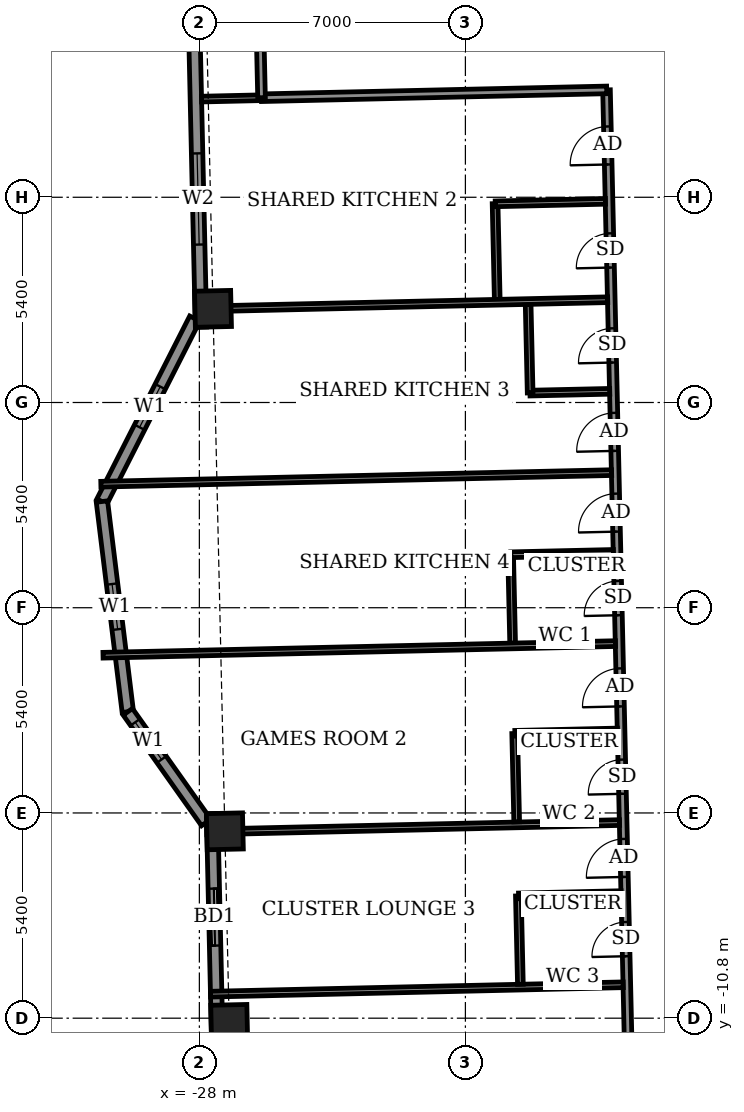
"""IFC4 building model, lengths in metres.
Left out: names, types, materials, properties, quantities, classifications, styles, units other than length and angle.
Written with IfcOpenShell. Run it as: python <this file> out.ifc"""

import sys

from ifc_helpers import new_model, si_unit, direction, frame, frame_2d, origin, origin_2d, place, context, subcontext, project, spatial, rectangle, extrude, element, fill, save


model = new_model("IFC4")
c1 = context("Model", 3, precision=1e-05, world=origin(), true_north=direction((0.0, 1.0)))
c2 = subcontext(c1, "Body", "Model", "MODEL_VIEW")
j1 = project(units=[si_unit("LENGTHUNIT", "METRE"), si_unit("PLANEANGLEUNIT", "RADIAN")], contexts=[c1])
p1 = place(None, origin())
s1 = spatial("IfcSite", under=j1, at=p1, CompositionType="ELEMENT")
p2 = place(p1, origin())
s2 = spatial("IfcBuilding", under=s1, at=p2, CompositionType="ELEMENT")
p3 = place(p2, frame((0.0, 0.0, 290.7)))
s3 = spatial("IfcBuildingStorey", under=s2, at=p3, CompositionType="ELEMENT", Elevation=290.7)
for number, where, z_axis, x_axis in (
    (1, (-27.329, -5.883, -0.55), (0.0, 0.0, 1.0), (0.023, -1.0, 0.0)),
    (2, (-27.215, -10.924, -0.55), (0.0, 0.0, 1.0), (0.023, -1.0, 0.0)),
    (3, (-27.641, 7.864, -0.55), (0.0, 0.0, 1.0), (0.023, -1.0, 0.0)),
):
    element("IfcColumn", number, at=place(p3, frame(where, z_axis=z_axis, x_axis=x_axis)), inside=s3, PredefinedType="COLUMN", context=c2, shape_type="SweptSolid", body=[
        extrude(rectangle(XDim=0.95, YDim=0.95, at=origin_2d()), origin(), (0.0, 0.0, 1.0), 3.6),
    ])
p4 = place(p3, frame((-28.297, 22.427, 0.0), z_axis=(0.0, 0.0, 1.0), x_axis=(0.022663916124, -0.999743140465, 0.0)))
e4 = element("IfcWall", 4, at=p4, inside=s3, PredefinedType="SOLIDWALL", context=c2, shape_type="SweptSolid", body=[
    extrude(rectangle(XDim=15.049, YDim=0.3, at=frame_2d((7.524, 0.0))), origin(), (0.0, 0.0, 1.0), 2.5),
])
p5 = place(p4, frame((3.002, 0.0, 0.0)))
e5 = element("IfcOpeningElement", 5, at=p5, cuts=e4, PredefinedType="OPENING", context=c2, shape_type="SweptSolid", body=[
    extrude(rectangle(XDim=1.5, YDim=2.4, at=frame_2d((0.75, 1.2))), frame((0.0, 0.16, 0.0), z_axis=(0.0, -1.0, 0.0), x_axis=(1.0, 0.0, 0.0)), (0.0, 0.0, 1.0), 0.32),
])
p6 = place(p4, frame((10.475, 0.0, 0.9)))
e6 = element("IfcOpeningElement", 6, at=p6, cuts=e4, PredefinedType="OPENING", context=c2, shape_type="SweptSolid", body=[
    extrude(rectangle(XDim=2.4, YDim=1.5, at=frame_2d((1.2, 0.75))), frame((0.0, 0.16, 0.0), z_axis=(0.0, -1.0, 0.0), x_axis=(1.0, 0.0, 0.0)), (0.0, 0.0, 1.0), 0.32),
])
p7 = place(p3, frame((-28.12, 7.608, 0.0), z_axis=(0.0, 0.0, 1.0), x_axis=(-0.45266802131, -0.891679125293, 0.0)))
e7 = element("IfcWall", 7, at=p7, inside=s3, PredefinedType="SOLIDWALL", context=c2, shape_type="SweptSolid", body=[
    extrude(rectangle(XDim=5.399, YDim=0.3, at=frame_2d((2.699, 0.0))), origin(), (0.0, 0.0, 1.0), 3.05),
])
p8 = place(p7, frame((2.008, 0.0, 0.9)))
e8 = element("IfcOpeningElement", 8, at=p8, cuts=e7, PredefinedType="OPENING", context=c2, shape_type="SweptSolid", body=[
    extrude(rectangle(XDim=1.2, YDim=1.5, at=frame_2d((0.6, 0.75))), frame((0.0, 0.16, 0.0), z_axis=(0.0, -1.0, 0.0), x_axis=(1.0, 0.0, 0.0)), (0.0, 0.0, 1.0), 0.32),
])
p9 = place(p3, frame((-30.564, 2.794, 0.0), z_axis=(0.0, 0.0, 1.0), x_axis=(0.122163831021, -0.992509948761, 0.0)))
e9 = element("IfcWall", 9, at=p9, inside=s3, PredefinedType="SOLIDWALL", context=c2, shape_type="SweptSolid", body=[
    extrude(rectangle(XDim=5.574, YDim=0.3, at=frame_2d((2.787, 0.0))), origin(), (0.0, 0.0, 1.0), 3.05),
])
p10 = place(p9, frame((2.187, 0.0, 0.9)))
e10 = element("IfcOpeningElement", 10, at=p10, cuts=e9, PredefinedType="OPENING", context=c2, shape_type="SweptSolid", body=[
    extrude(rectangle(XDim=1.2, YDim=1.5, at=frame_2d((0.6, 0.75))), frame((0.0, 0.16, 0.0), z_axis=(0.0, -1.0, 0.0), x_axis=(1.0, 0.0, 0.0)), (0.0, 0.0, 1.0), 0.32),
])
p11 = place(p3, frame((-29.883, -2.738, 0.0), z_axis=(0.0, 0.0, 1.0), x_axis=(0.578095163598, -0.815969351033, 0.0)))
e11 = element("IfcWall", 11, at=p11, inside=s3, PredefinedType="SOLIDWALL", context=c2, shape_type="SweptSolid", body=[
    extrude(rectangle(XDim=3.569, YDim=0.3, at=frame_2d((1.784, 0.0))), origin(), (0.0, 0.0, 1.0), 3.05),
])
p12 = place(p11, frame((0.338, 0.0, 0.9)))
e12 = element("IfcOpeningElement", 12, at=p12, cuts=e11, PredefinedType="OPENING", context=c2, shape_type="SweptSolid", body=[
    extrude(rectangle(XDim=1.2, YDim=1.5, at=frame_2d((0.6, 0.75))), frame((0.0, 0.16, 0.0), z_axis=(0.0, -1.0, 0.0), x_axis=(1.0, 0.0, 0.0)), (0.0, 0.0, 1.0), 0.32),
])
p13 = place(p3, frame((-27.665, -5.416, 0.0), z_axis=(0.0, 0.0, 1.0), x_axis=(0.022660024814, -0.999743228672, 0.0)))
e13 = element("IfcWall", 13, at=p13, inside=s3, PredefinedType="SOLIDWALL", context=c2, shape_type="SweptSolid", body=[
    extrude(rectangle(XDim=15.45, YDim=0.3, at=frame_2d((7.725, 0.0))), origin(), (0.0, 0.0, 1.0), 2.55),
])
p14 = place(p13, frame((1.975, 0.0, 0.0)))
e14 = element("IfcOpeningElement", 14, at=p14, cuts=e13, PredefinedType="OPENING", context=c2, shape_type="SweptSolid", body=[
    extrude(rectangle(XDim=1.5, YDim=2.4, at=frame_2d((0.75, 1.2))), frame((0.0, 0.16, 0.0), z_axis=(0.0, -1.0, 0.0), x_axis=(1.0, 0.0, 0.0)), (0.0, 0.0, 1.0), 0.32),
])
p15 = place(p13, frame((6.171, 0.0, 0.9)))
e15 = element("IfcOpeningElement", 15, at=p15, cuts=e13, PredefinedType="OPENING", context=c2, shape_type="SweptSolid", body=[
    extrude(rectangle(XDim=1.2, YDim=1.5, at=frame_2d((0.6, 0.75))), frame((0.0, 0.16, 0.0), z_axis=(0.0, -1.0, 0.0), x_axis=(1.0, 0.0, 0.0)), (0.0, 0.0, 1.0), 0.32),
])
p16 = place(p13, frame((8.05, 0.0, 0.9)))
e16 = element("IfcOpeningElement", 16, at=p16, cuts=e13, PredefinedType="OPENING", context=c2, shape_type="SweptSolid", body=[
    extrude(rectangle(XDim=0.9, YDim=1.5, at=frame_2d((0.45, 0.75))), frame((0.0, 0.16, 0.0), z_axis=(0.0, -1.0, 0.0), x_axis=(1.0, 0.0, 0.0)), (0.0, 0.0, 1.0), 0.32),
])
p17 = place(p13, frame((11.625, 0.0, 0.9)))
e17 = element("IfcOpeningElement", 17, at=p17, cuts=e13, PredefinedType="OPENING", context=c2, shape_type="SweptSolid", body=[
    extrude(rectangle(XDim=2.4, YDim=1.5, at=frame_2d((1.2, 0.75))), frame((0.0, 0.16, 0.0), z_axis=(0.0, -1.0, 0.0), x_axis=(1.0, 0.0, 0.0)), (0.0, 0.0, 1.0), 0.32),
])
p18 = place(p3, frame((-16.684, -12.919, 0.0), z_axis=(0.0, 0.0, 1.0), x_axis=(-0.022712214871, 0.999742044377, 0.0)))
e18 = element("IfcWall", 18, at=p18, inside=s3, PredefinedType="PARTITIONING", context=c2, shape_type="SweptSolid", body=[
    extrude(rectangle(XDim=26.551, YDim=0.2, at=frame_2d((13.275, 0.0))), origin(), (0.0, 0.0, 1.0), 3.05),
])
p19 = place(p18, frame((24.588, 0.0, 0.0)))
e19 = element("IfcOpeningElement", 19, at=p19, cuts=e18, PredefinedType="OPENING", context=c2, shape_type="SweptSolid", body=[
    extrude(rectangle(XDim=1.0, YDim=2.1, at=frame_2d((0.5, 1.05))), frame((0.0, 0.11, 0.0), z_axis=(0.0, -1.0, 0.0), x_axis=(1.0, 0.0, 0.0)), (0.0, 0.0, 1.0), 0.22),
])
p20 = place(p18, frame((21.875, 0.0, 0.0)))
e20 = element("IfcOpeningElement", 20, at=p20, cuts=e18, PredefinedType="OPENING", context=c2, shape_type="SweptSolid", body=[
    extrude(rectangle(XDim=0.9, YDim=2.1, at=frame_2d((0.45, 1.05))), frame((0.0, 0.11, 0.0), z_axis=(0.0, -1.0, 0.0), x_axis=(1.0, 0.0, 0.0)), (0.0, 0.0, 1.0), 0.22),
])
p21 = place(p18, frame((17.05, 0.0, 0.0)))
e21 = element("IfcOpeningElement", 21, at=p21, cuts=e18, PredefinedType="OPENING", context=c2, shape_type="SweptSolid", body=[
    extrude(rectangle(XDim=1.0, YDim=2.1, at=frame_2d((0.5, 1.05))), frame((0.0, 0.11, 0.0), z_axis=(0.0, -1.0, 0.0), x_axis=(1.0, 0.0, 0.0)), (0.0, 0.0, 1.0), 0.22),
])
p22 = place(p18, frame((19.375, 0.0, 0.0)))
e22 = element("IfcOpeningElement", 22, at=p22, cuts=e18, PredefinedType="OPENING", context=c2, shape_type="SweptSolid", body=[
    extrude(rectangle(XDim=0.9, YDim=2.1, at=frame_2d((0.45, 1.05))), frame((0.0, 0.11, 0.0), z_axis=(0.0, -1.0, 0.0), x_axis=(1.0, 0.0, 0.0)), (0.0, 0.0, 1.0), 0.22),
])
p23 = place(p18, frame((14.925, 0.0, 0.0)))
e23 = element("IfcOpeningElement", 23, at=p23, cuts=e18, PredefinedType="OPENING", context=c2, shape_type="SweptSolid", body=[
    extrude(rectangle(XDim=1.0, YDim=2.1, at=frame_2d((0.5, 1.05))), frame((0.0, 0.11, 0.0), z_axis=(0.0, -1.0, 0.0), x_axis=(1.0, 0.0, 0.0)), (0.0, 0.0, 1.0), 0.22),
])
p24 = place(p18, frame((12.725, 0.0, 0.0)))
e24 = element("IfcOpeningElement", 24, at=p24, cuts=e18, PredefinedType="OPENING", context=c2, shape_type="SweptSolid", body=[
    extrude(rectangle(XDim=0.9, YDim=2.1, at=frame_2d((0.45, 1.05))), frame((0.0, 0.11, 0.0), z_axis=(0.0, -1.0, 0.0), x_axis=(1.0, 0.0, 0.0)), (0.0, 0.0, 1.0), 0.22),
])
p25 = place(p18, frame((10.325, 0.0, 0.0)))
e25 = element("IfcOpeningElement", 25, at=p25, cuts=e18, PredefinedType="OPENING", context=c2, shape_type="SweptSolid", body=[
    extrude(rectangle(XDim=1.0, YDim=2.1, at=frame_2d((0.5, 1.05))), frame((0.0, 0.11, 0.0), z_axis=(0.0, -1.0, 0.0), x_axis=(1.0, 0.0, 0.0)), (0.0, 0.0, 1.0), 0.22),
])
p26 = place(p18, frame((8.025, 0.0, 0.0)))
e26 = element("IfcOpeningElement", 26, at=p26, cuts=e18, PredefinedType="OPENING", context=c2, shape_type="SweptSolid", body=[
    extrude(rectangle(XDim=0.9, YDim=2.1, at=frame_2d((0.45, 1.05))), frame((0.0, 0.11, 0.0), z_axis=(0.0, -1.0, 0.0), x_axis=(1.0, 0.0, 0.0)), (0.0, 0.0, 1.0), 0.22),
])
p27 = place(p18, frame((5.837, 0.0, 0.0)))
e27 = element("IfcOpeningElement", 27, at=p27, cuts=e18, PredefinedType="OPENING", context=c2, shape_type="SweptSolid", body=[
    extrude(rectangle(XDim=1.0, YDim=2.1, at=frame_2d((0.5, 1.05))), frame((0.0, 0.11, 0.0), z_axis=(0.0, -1.0, 0.0), x_axis=(1.0, 0.0, 0.0)), (0.0, 0.0, 1.0), 0.22),
])
p28 = place(p18, frame((3.75, 0.0, 0.0)))
e28 = element("IfcOpeningElement", 28, at=p28, cuts=e18, PredefinedType="OPENING", context=c2, shape_type="SweptSolid", body=[
    extrude(rectangle(XDim=0.9, YDim=2.1, at=frame_2d((0.45, 1.05))), frame((0.0, 0.11, 0.0), z_axis=(0.0, -1.0, 0.0), x_axis=(1.0, 0.0, 0.0)), (0.0, 0.0, 1.0), 0.22),
])
p29 = place(p3, frame((-27.707, -10.168, 0.0), z_axis=(0.0, 0.0, 1.0), x_axis=(0.999741313154, 0.022744378952, 0.0)))
e29 = element("IfcWall", 29, at=p29, inside=s3, PredefinedType="PARTITIONING", context=c2, shape_type="SweptSolid", body=[
    extrude(rectangle(XDim=10.863, YDim=0.15, at=frame_2d((5.432, 0.0))), origin(), (0.0, 0.0, 1.0), 2.55),
])
p30 = place(p3, frame((-19.553, -9.908, 0.0), z_axis=(0.0, 0.0, 1.0), x_axis=(-0.022781023197, 0.999740478815, 0.0)))
e30 = element("IfcWall", 30, at=p30, inside=s3, PredefinedType="PARTITIONING", context=c2, shape_type="SweptSolid", body=[
    extrude(rectangle(XDim=2.325, YDim=0.15, at=frame_2d((1.163, 0.0))), origin(), (0.0, 0.0, 1.0), 3.05),
])
p31 = place(p3, frame((-19.601, -7.583, 0.0), z_axis=(0.0, 0.0, 1.0), x_axis=(0.999744396973, 0.02260842146, 0.0)))
e31 = element("IfcWall", 31, at=p31, inside=s3, PredefinedType="PARTITIONING", context=c2, shape_type="SweptSolid", body=[
    extrude(rectangle(XDim=2.7, YDim=0.15, at=frame_2d((1.35, 0.0))), origin(), (0.0, 0.0, 1.0), 3.05),
])
p32 = place(p3, frame((-27.804, -5.899, 0.0), z_axis=(0.0, 0.0, 1.0), x_axis=(0.999743850541, 0.02263257177, 0.0)))
e32 = element("IfcWall", 32, at=p32, inside=s3, PredefinedType="PARTITIONING", context=c2, shape_type="SweptSolid", body=[
    extrude(rectangle(XDim=10.863, YDim=0.15, at=frame_2d((5.431, 0.0))), origin(), (0.0, 0.0, 1.0), 3.05),
])
p33 = place(p3, frame((-19.65, -5.634, 0.0), z_axis=(0.0, 0.0, 1.0), x_axis=(-0.02279059109, 0.999740260747, 0.0)))
e33 = element("IfcWall", 33, at=p33, inside=s3, PredefinedType="PARTITIONING", context=c2, shape_type="SweptSolid", body=[
    extrude(rectangle(XDim=2.324, YDim=0.15, at=frame_2d((1.162, 0.0))), origin(), (0.0, 0.0, 1.0), 3.05),
])
p34 = place(p3, frame((-19.698, -3.304, 0.0), z_axis=(0.0, 0.0, 1.0), x_axis=(0.999744396973, 0.02260842146, 0.0)))
e34 = element("IfcWall", 34, at=p34, inside=s3, PredefinedType="PARTITIONING", context=c2, shape_type="SweptSolid", body=[
    extrude(rectangle(XDim=2.7, YDim=0.15, at=frame_2d((1.35, 0.0))), origin(), (0.0, 0.0, 1.0), 3.05),
])
p35 = place(p3, frame((-19.757, -0.935, 0.0), z_axis=(0.0, 0.0, 1.0), x_axis=(-0.02279059109, 0.999740260747, 0.0)))
e35 = element("IfcWall", 35, at=p35, inside=s3, PredefinedType="PARTITIONING", context=c2, shape_type="SweptSolid", body=[
    extrude(rectangle(XDim=2.324, YDim=0.15, at=frame_2d((1.162, 0.0))), origin(), (0.0, 0.0, 1.0), 3.05),
])
p36 = place(p3, frame((-30.535, -1.25, 0.0), z_axis=(0.0, 0.0, 1.0), x_axis=(0.999742750552, 0.022681109296, 0.0)))
e36 = element("IfcWall", 36, at=p36, inside=s3, PredefinedType="PARTITIONING", context=c2, shape_type="SweptSolid", body=[
    extrude(rectangle(XDim=13.487, YDim=0.15, at=frame_2d((6.744, 0.0))), origin(), (0.0, 0.0, 1.0), 2.05),
])
p37 = place(p3, frame((-19.805, 1.394, 0.0), z_axis=(0.0, 0.0, 1.0), x_axis=(0.999736346258, 0.022961663075, 0.0)))
e37 = element("IfcWall", 37, at=p37, inside=s3, PredefinedType="PARTITIONING", context=c2, shape_type="SweptSolid", body=[
    extrude(rectangle(XDim=2.701, YDim=0.15, at=frame_2d((1.35, 0.0))), origin(), (0.0, 0.0, 1.0), 3.05),
])
p38 = place(p3, frame((-30.592, 3.25, 0.0), z_axis=(0.0, 0.0, 1.0), x_axis=(0.999742678725, 0.022684275074, 0.0)))
e38 = element("IfcWall", 38, at=p38, inside=s3, PredefinedType="PARTITIONING", context=c2, shape_type="SweptSolid", body=[
    extrude(rectangle(XDim=13.442, YDim=0.15, at=frame_2d((6.721, 0.0))), origin(), (0.0, 0.0, 1.0), 2.05),
])
p39 = place(p3, frame((-19.301, 5.647, 0.0), z_axis=(0.0, 0.0, 1.0), x_axis=(0.999748159451, 0.022441427631, 0.0)))
e39 = element("IfcWall", 39, at=p39, inside=s3, PredefinedType="PARTITIONING", context=c2, shape_type="SweptSolid", body=[
    extrude(rectangle(XDim=2.1, YDim=0.15, at=frame_2d((1.05, 0.0))), origin(), (0.0, 0.0, 1.0), 3.05),
])
p40 = place(p3, frame((-19.296, 5.652, 0.0), z_axis=(0.0, 0.0, 1.0), x_axis=(-0.022895561926, 0.999737862264, 0.0)))
e40 = element("IfcWall", 40, at=p40, inside=s3, PredefinedType="PARTITIONING", context=c2, shape_type="SweptSolid", body=[
    extrude(rectangle(XDim=2.324, YDim=0.15, at=frame_2d((1.162, 0.0))), origin(), (0.0, 0.0, 1.0), 3.05),
])
p41 = place(p3, frame((-20.162, 8.108, 0.0), z_axis=(0.0, 0.0, 1.0), x_axis=(-0.022530308093, 0.999746160391, 0.0)))
e41 = element("IfcWall", 41, at=p41, inside=s3, PredefinedType="PARTITIONING", context=c2, shape_type="SweptSolid", body=[
    extrude(rectangle(XDim=2.525, YDim=0.15, at=frame_2d((1.262, 0.0))), origin(), (0.0, 0.0, 1.0), 3.05),
])
p42 = place(p3, frame((-27.817, 7.864, 0.0), z_axis=(0.0, 0.0, 1.0), x_axis=(0.9997418952, 0.022718780382, 0.0)))
e42 = element("IfcWall", 42, at=p42, inside=s3, PredefinedType="PARTITIONING", context=c2, shape_type="SweptSolid", body=[
    extrude(rectangle(XDim=10.563, YDim=0.15, at=frame_2d((5.282, 0.0))), origin(), (0.0, 0.0, 1.0), 3.05),
])
p43 = place(p3, frame((-20.214, 10.627, 0.0), z_axis=(0.0, 0.0, 1.0), x_axis=(0.999739701447, 0.022815112345, 0.0)))
e43 = element("IfcWall", 43, at=p43, inside=s3, PredefinedType="PARTITIONING", context=c2, shape_type="SweptSolid", body=[
    extrude(rectangle(XDim=2.9, YDim=0.15, at=frame_2d((1.45, 0.0))), origin(), (0.0, 0.0, 1.0), 3.05),
])
p44 = place(p3, frame((-27.942, 13.383, 0.0), z_axis=(0.0, 0.0, 1.0), x_axis=(0.999741755729, 0.022724916977, 0.0)))
e44 = element("IfcWall", 44, at=p44, inside=s3, PredefinedType="PARTITIONING", context=c2, shape_type="SweptSolid", body=[
    extrude(rectangle(XDim=1.579, YDim=0.15, at=frame_2d((0.79, 0.0))), origin(), (0.0, 0.0, 1.0), 2.5),
])
p45 = place(p3, frame((-26.367, 13.419, 0.0), z_axis=(0.0, 0.0, 1.0), x_axis=(0.999742888587, 0.022675024131, 0.0)))
e45 = element("IfcWall", 45, at=p45, inside=s3, PredefinedType="PARTITIONING", context=c2, shape_type="SweptSolid", body=[
    extrude(rectangle(XDim=9.087, YDim=0.2, at=frame_2d((4.544, 0.0))), origin(), (0.0, 0.0, 1.0), 3.05),
])
p46 = place(p3, frame((-26.364, 13.419, 0.0), z_axis=(0.0, 0.0, 1.0), x_axis=(-0.022632637625, 0.99974384905, 0.0)))
e46 = element("IfcWall", 46, at=p46, inside=s3, PredefinedType="PARTITIONING", context=c2, shape_type="SweptSolid", body=[
    extrude(rectangle(XDim=1.5, YDim=0.2, at=frame_2d((0.75, 0.0))), origin(), (0.0, 0.0, 1.0), 3.05),
])
p47 = place(p6, origin())
e47 = element("IfcWindow", 47, at=p47, inside=s3, PartitioningType="DOUBLE_PANEL_VERTICAL", PredefinedType="WINDOW", context=c2, shape_type="SweptSolid", body=[
    extrude(rectangle(XDim=2.4, YDim=1.5, at=frame_2d((1.2, 0.75))), frame((0.0, 0.03, 0.0), z_axis=(0.0, -1.0, 0.0), x_axis=(1.0, 0.0, 0.0)), (0.0, 0.0, 1.0), 0.06),
])
fill(e6, e47)
p48 = place(p8, origin())
e48 = element("IfcWindow", 48, at=p48, inside=s3, PartitioningType="SINGLE_PANEL", PredefinedType="WINDOW", context=c2, shape_type="SweptSolid", body=[
    extrude(rectangle(XDim=1.2, YDim=1.5, at=frame_2d((0.6, 0.75))), frame((0.0, 0.03, 0.0), z_axis=(0.0, -1.0, 0.0), x_axis=(1.0, 0.0, 0.0)), (0.0, 0.0, 1.0), 0.06),
])
fill(e8, e48)
p49 = place(p10, origin())
e49 = element("IfcWindow", 49, at=p49, inside=s3, PartitioningType="SINGLE_PANEL", PredefinedType="WINDOW", context=c2, shape_type="SweptSolid", body=[
    extrude(rectangle(XDim=1.2, YDim=1.5, at=frame_2d((0.6, 0.75))), frame((0.0, 0.03, 0.0), z_axis=(0.0, -1.0, 0.0), x_axis=(1.0, 0.0, 0.0)), (0.0, 0.0, 1.0), 0.06),
])
fill(e10, e49)
p50 = place(p12, origin())
e50 = element("IfcWindow", 50, at=p50, inside=s3, PartitioningType="SINGLE_PANEL", PredefinedType="WINDOW", context=c2, shape_type="SweptSolid", body=[
    extrude(rectangle(XDim=1.2, YDim=1.5, at=frame_2d((0.6, 0.75))), frame((0.0, 0.03, 0.0), z_axis=(0.0, -1.0, 0.0), x_axis=(1.0, 0.0, 0.0)), (0.0, 0.0, 1.0), 0.06),
])
fill(e12, e50)
p51 = place(p14, origin())
e51 = element("IfcDoor", 51, at=p51, inside=s3, OperationType="SLIDING_TO_LEFT", PredefinedType="DOOR", context=c2, shape_type="SweptSolid", body=[
    extrude(rectangle(XDim=1.5, YDim=2.4, at=frame_2d((0.75, 1.2))), frame((0.0, 0.025, 0.0), z_axis=(0.0, -1.0, 0.0), x_axis=(1.0, 0.0, 0.0)), (0.0, 0.0, 1.0), 0.05),
])
fill(e14, e51)
p52 = place(p19, origin())
e52 = element("IfcDoor", 52, at=p52, inside=s3, OperationType="SINGLE_SWING_LEFT", PredefinedType="DOOR", context=c2, shape_type="SweptSolid", body=[
    extrude(rectangle(XDim=1.0, YDim=2.1, at=frame_2d((0.5, 1.05))), frame((0.0, 0.025, 0.0), z_axis=(0.0, -1.0, 0.0), x_axis=(1.0, 0.0, 0.0)), (0.0, 0.0, 1.0), 0.05),
])
fill(e19, e52)
p53 = place(p20, origin())
e53 = element("IfcDoor", 53, at=p53, inside=s3, OperationType="SINGLE_SWING_LEFT", PredefinedType="DOOR", context=c2, shape_type="SweptSolid", body=[
    extrude(rectangle(XDim=0.9, YDim=2.1, at=frame_2d((0.45, 1.05))), frame((0.0, 0.025, 0.0), z_axis=(0.0, -1.0, 0.0), x_axis=(1.0, 0.0, 0.0)), (0.0, 0.0, 1.0), 0.05),
])
fill(e20, e53)
p54 = place(p21, origin())
e54 = element("IfcDoor", 54, at=p54, inside=s3, OperationType="SINGLE_SWING_RIGHT", PredefinedType="DOOR", context=c2, shape_type="SweptSolid", body=[
    extrude(rectangle(XDim=1.0, YDim=2.1, at=frame_2d((0.5, 1.05))), frame((0.0, 0.025, 0.0), z_axis=(0.0, -1.0, 0.0), x_axis=(1.0, 0.0, 0.0)), (0.0, 0.0, 1.0), 0.05),
])
fill(e21, e54)
p55 = place(p22, origin())
e55 = element("IfcDoor", 55, at=p55, inside=s3, OperationType="SINGLE_SWING_RIGHT", PredefinedType="DOOR", context=c2, shape_type="SweptSolid", body=[
    extrude(rectangle(XDim=0.9, YDim=2.1, at=frame_2d((0.45, 1.05))), frame((0.0, 0.025, 0.0), z_axis=(0.0, -1.0, 0.0), x_axis=(1.0, 0.0, 0.0)), (0.0, 0.0, 1.0), 0.05),
])
fill(e22, e55)
p56 = place(p23, origin())
e56 = element("IfcDoor", 56, at=p56, inside=s3, OperationType="SINGLE_SWING_LEFT", PredefinedType="DOOR", context=c2, shape_type="SweptSolid", body=[
    extrude(rectangle(XDim=1.0, YDim=2.1, at=frame_2d((0.5, 1.05))), frame((0.0, 0.025, 0.0), z_axis=(0.0, -1.0, 0.0), x_axis=(1.0, 0.0, 0.0)), (0.0, 0.0, 1.0), 0.05),
])
fill(e23, e56)
p57 = place(p24, origin())
e57 = element("IfcDoor", 57, at=p57, inside=s3, OperationType="SINGLE_SWING_LEFT", PredefinedType="DOOR", context=c2, shape_type="SweptSolid", body=[
    extrude(rectangle(XDim=0.9, YDim=2.1, at=frame_2d((0.45, 1.05))), frame((0.0, 0.025, 0.0), z_axis=(0.0, -1.0, 0.0), x_axis=(1.0, 0.0, 0.0)), (0.0, 0.0, 1.0), 0.05),
])
fill(e24, e57)
p58 = place(p25, origin())
e58 = element("IfcDoor", 58, at=p58, inside=s3, OperationType="SINGLE_SWING_RIGHT", PredefinedType="DOOR", context=c2, shape_type="SweptSolid", body=[
    extrude(rectangle(XDim=1.0, YDim=2.1, at=frame_2d((0.5, 1.05))), frame((0.0, 0.025, 0.0), z_axis=(0.0, -1.0, 0.0), x_axis=(1.0, 0.0, 0.0)), (0.0, 0.0, 1.0), 0.05),
])
fill(e25, e58)
p59 = place(p26, origin())
e59 = element("IfcDoor", 59, at=p59, inside=s3, OperationType="SINGLE_SWING_RIGHT", PredefinedType="DOOR", context=c2, shape_type="SweptSolid", body=[
    extrude(rectangle(XDim=0.9, YDim=2.1, at=frame_2d((0.45, 1.05))), frame((0.0, 0.025, 0.0), z_axis=(0.0, -1.0, 0.0), x_axis=(1.0, 0.0, 0.0)), (0.0, 0.0, 1.0), 0.05),
])
fill(e26, e59)
p60 = place(p27, origin())
e60 = element("IfcDoor", 60, at=p60, inside=s3, OperationType="SINGLE_SWING_LEFT", PredefinedType="DOOR", context=c2, shape_type="SweptSolid", body=[
    extrude(rectangle(XDim=1.0, YDim=2.1, at=frame_2d((0.5, 1.05))), frame((0.0, 0.025, 0.0), z_axis=(0.0, -1.0, 0.0), x_axis=(1.0, 0.0, 0.0)), (0.0, 0.0, 1.0), 0.05),
])
fill(e27, e60)
p61 = place(p28, origin())
e61 = element("IfcDoor", 61, at=p61, inside=s3, OperationType="SINGLE_SWING_LEFT", PredefinedType="DOOR", context=c2, shape_type="SweptSolid", body=[
    extrude(rectangle(XDim=0.9, YDim=2.1, at=frame_2d((0.45, 1.05))), frame((0.0, 0.025, 0.0), z_axis=(0.0, -1.0, 0.0), x_axis=(1.0, 0.0, 0.0)), (0.0, 0.0, 1.0), 0.05),
])
fill(e28, e61)
save(model, sys.argv[1])
